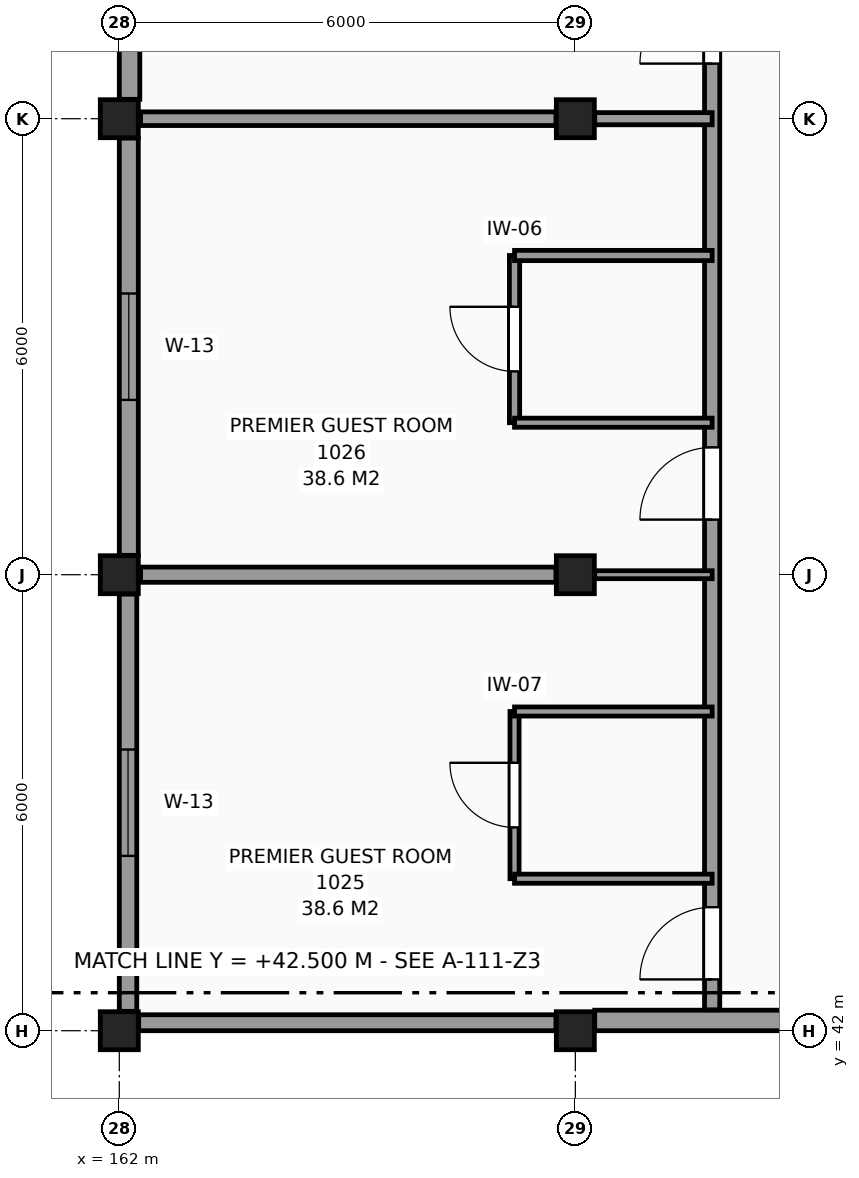
"""IFC4 building model, lengths in metres.
Left out: names, types, materials, properties, quantities, classifications, styles, units other than length and angle.
Written with IfcOpenShell. Run it as: python <this file> out.ifc"""

import sys

from ifc_helpers import new_model, si_unit, direction, frame, frame_2d, origin, origin_2d, place, context, subcontext, project, spatial, rectangle, extrude, element, fill, save


model = new_model("IFC4")
c1 = context("Model", 3, precision=1e-05, world=origin(), true_north=direction((0.0, 1.0)))
c2 = subcontext(c1, "Body", "Model", "MODEL_VIEW")
j1 = project(units=[si_unit("LENGTHUNIT", "METRE"), si_unit("PLANEANGLEUNIT", "RADIAN")], contexts=[c1])
p1 = place(None, origin())
s1 = spatial("IfcSite", under=j1, at=p1, CompositionType="ELEMENT")
p2 = place(p1, origin())
s2 = spatial("IfcBuilding", under=s1, at=p2, CompositionType="ELEMENT")
p3 = place(p2, frame((0.0, 0.0, 41.4)))
s3 = spatial("IfcBuildingStorey", under=s2, at=p3, CompositionType="ELEMENT", Elevation=41.4)
for number, where, z_axis, x_axis in (
    (1, (162.0, 42.0, 0.0), (0.0, 0.0, 1.0), (1.0, 0.0, 0.0)),
    (2, (162.0, 48.0, 0.0), (0.0, 0.0, 1.0), (1.0, 0.0, 0.0)),
    (3, (162.0, 54.0, 0.0), (0.0, 0.0, 1.0), (1.0, 0.0, 0.0)),
    (4, (168.0, 42.0, 0.0), (0.0, 0.0, 1.0), (1.0, 0.0, 0.0)),
    (5, (168.0, 48.0, 0.0), (0.0, 0.0, 1.0), (1.0, 0.0, 0.0)),
    (6, (168.0, 54.0, 0.0), (0.0, 0.0, 1.0), (1.0, 0.0, 0.0)),
):
    element("IfcColumn", number, at=place(p3, frame(where, z_axis=z_axis, x_axis=x_axis)), inside=s3, PredefinedType="COLUMN", context=c2, shape_type="SweptSolid", body=[
        extrude(rectangle(XDim=0.5, YDim=0.5, at=origin_2d()), origin(), (0.0, 0.0, 1.0), 3.3),
    ])
p4 = place(p3, frame((162.135, 59.745, 0.0), z_axis=(0.0, 0.0, 1.0), x_axis=(0.0, -1.0, 0.0)))
e7 = element("IfcWall", 7, at=p4, inside=s3, PredefinedType="SOLIDWALL", context=c2, shape_type="SweptSolid", body=[
    extrude(rectangle(XDim=5.49, YDim=0.27, at=frame_2d((2.745, 0.0))), origin(), (0.0, 0.0, 1.0), 2.445),
])
p5 = place(p4, frame((2.045, 0.0, 0.8)))
e8 = element("IfcOpeningElement", 8, at=p5, cuts=e7, PredefinedType="OPENING", context=c2, shape_type="SweptSolid", body=[
    extrude(rectangle(XDim=1.4, YDim=1.4, at=frame_2d((0.7, 0.7))), frame((0.0, 0.145, 0.0), z_axis=(0.0, -1.0, 0.0), x_axis=(1.0, 0.0, 0.0)), (0.0, 0.0, 1.0), 0.29),
])
p6 = place(p3, frame((162.125, 53.745, 0.0), z_axis=(0.0, 0.0, 1.0), x_axis=(0.0, -1.0, 0.0)))
e9 = element("IfcWall", 9, at=p6, inside=s3, PredefinedType="SOLIDWALL", context=c2, shape_type="SweptSolid", body=[
    extrude(rectangle(XDim=5.49, YDim=0.25, at=frame_2d((2.745, 0.0))), origin(), (0.0, 0.0, 1.0), 2.445),
])
p7 = place(p6, frame((2.045, 0.0, 0.8)))
e10 = element("IfcOpeningElement", 10, at=p7, cuts=e9, PredefinedType="OPENING", context=c2, shape_type="SweptSolid", body=[
    extrude(rectangle(XDim=1.4, YDim=1.4, at=frame_2d((0.7, 0.7))), frame((0.0, 0.135, 0.0), z_axis=(0.0, -1.0, 0.0), x_axis=(1.0, 0.0, 0.0)), (0.0, 0.0, 1.0), 0.27),
])
p8 = place(p3, frame((162.115, 47.745, 0.0), z_axis=(0.0, 0.0, 1.0), x_axis=(0.0, -1.0, 0.0)))
e11 = element("IfcWall", 11, at=p8, inside=s3, PredefinedType="SOLIDWALL", context=c2, shape_type="SweptSolid", body=[
    extrude(rectangle(XDim=5.49, YDim=0.23, at=frame_2d((2.745, 0.0))), origin(), (0.0, 0.0, 1.0), 2.445),
])
p9 = place(p8, frame((2.045, 0.0, 0.8)))
e12 = element("IfcOpeningElement", 12, at=p9, cuts=e11, PredefinedType="OPENING", context=c2, shape_type="SweptSolid", body=[
    extrude(rectangle(XDim=1.4, YDim=1.4, at=frame_2d((0.7, 0.7))), frame((0.0, 0.125, 0.0), z_axis=(0.0, -1.0, 0.0), x_axis=(1.0, 0.0, 0.0)), (0.0, 0.0, 1.0), 0.25),
])
p10 = place(p3, frame((162.255, 42.105, 0.0), z_axis=(0.0, 0.0, 1.0), x_axis=(1.0, 0.0, 0.0)))
e13 = element("IfcWall", 13, at=p10, inside=s3, PredefinedType="SOLIDWALL", context=c2, shape_type="SweptSolid", body=[
    extrude(rectangle(XDim=5.49, YDim=0.21, at=frame_2d((2.745, 0.0))), origin(), (0.0, 0.0, 1.0), 2.295),
])
p11 = place(p3, frame((168.255, 42.135, 0.0), z_axis=(0.0, 0.0, 1.0), x_axis=(1.0, 0.0, 0.0)))
e14 = element("IfcWall", 14, at=p11, inside=s3, PredefinedType="SOLIDWALL", context=c2, shape_type="SweptSolid", body=[
    extrude(rectangle(XDim=5.49, YDim=0.27, at=frame_2d((2.745, 0.0))), origin(), (0.0, 0.0, 1.0), 2.295),
])
p12 = place(p3, frame((167.2, 44.0, 0.0), z_axis=(0.0, 0.0, 1.0), x_axis=(0.0, 1.0, 0.0)))
e15 = element("IfcWall", 15, at=p12, inside=s3, PredefinedType="PARTITIONING", context=c2, shape_type="SweptSolid", body=[
    extrude(rectangle(XDim=2.2, YDim=0.12, at=frame_2d((1.1, 0.0))), origin(), (0.0, 0.0, 1.0), 3.06),
])
p13 = place(p12, frame((0.675, 0.0, 0.0)))
e16 = element("IfcOpeningElement", 16, at=p13, cuts=e15, PredefinedType="OPENING", context=c2, shape_type="SweptSolid", body=[
    extrude(rectangle(XDim=0.85, YDim=2.1, at=frame_2d((0.425, 1.05))), frame((0.0, 0.07, 0.0), z_axis=(0.0, -1.0, 0.0), x_axis=(1.0, 0.0, 0.0)), (0.0, 0.0, 1.0), 0.14),
])
p14 = place(p3, frame((167.2, 50.0, 0.0), z_axis=(0.0, 0.0, 1.0), x_axis=(0.0, 1.0, 0.0)))
e17 = element("IfcWall", 17, at=p14, inside=s3, PredefinedType="PARTITIONING", context=c2, shape_type="SweptSolid", body=[
    extrude(rectangle(XDim=2.2, YDim=0.135, at=frame_2d((1.1, 0.0))), origin(), (0.0, 0.0, 1.0), 3.06),
])
p15 = place(p14, frame((0.675, 0.0, 0.0)))
e18 = element("IfcOpeningElement", 18, at=p15, cuts=e17, PredefinedType="OPENING", context=c2, shape_type="SweptSolid", body=[
    extrude(rectangle(XDim=0.85, YDim=2.1, at=frame_2d((0.425, 1.05))), frame((0.0, 0.078, 0.0), z_axis=(0.0, -1.0, 0.0), x_axis=(1.0, 0.0, 0.0)), (0.0, 0.0, 1.0), 0.155),
])
p16 = place(p3, frame((169.8, 42.275, 0.0), z_axis=(0.0, 0.0, 1.0), x_axis=(0.0, 1.0, 0.0)))
e19 = element("IfcWall", 19, at=p16, inside=s3, PredefinedType="PARTITIONING", context=c2, shape_type="SweptSolid", body=[
    extrude(rectangle(XDim=65.545, YDim=0.2, at=frame_2d((32.772, 0.0))), origin(), (0.0, 0.0, 1.0), 3.06),
])
p17 = place(p16, frame((50.125, 0.0, 0.0)))
e20 = element("IfcOpeningElement", 20, at=p17, cuts=e19, PredefinedType="OPENING", context=c2, shape_type="SweptSolid", body=[
    extrude(rectangle(XDim=1.2, YDim=2.2, at=frame_2d((0.6, 1.1))), frame((0.0, 0.11, 0.0), z_axis=(0.0, -1.0, 0.0), x_axis=(1.0, 0.0, 0.0)), (0.0, 0.0, 1.0), 0.22),
])
p18 = place(p16, frame((31.925, 0.0, 0.0)))
e21 = element("IfcOpeningElement", 21, at=p18, cuts=e19, PredefinedType="OPENING", context=c2, shape_type="SweptSolid", body=[
    extrude(rectangle(XDim=1.6, YDim=2.25, at=frame_2d((0.8, 1.125))), frame((0.0, 0.11, 0.0), z_axis=(0.0, -1.0, 0.0), x_axis=(1.0, 0.0, 0.0)), (0.0, 0.0, 1.0), 0.22),
])
p19 = place(p16, frame((0.4, 0.0, 0.0)))
e22 = element("IfcOpeningElement", 22, at=p19, cuts=e19, PredefinedType="OPENING", context=c2, shape_type="SweptSolid", body=[
    extrude(rectangle(XDim=0.95, YDim=2.1, at=frame_2d((0.475, 1.05))), frame((0.0, 0.11, 0.0), z_axis=(0.0, -1.0, 0.0), x_axis=(1.0, 0.0, 0.0)), (0.0, 0.0, 1.0), 0.22),
])
p20 = place(p16, frame((6.45, 0.0, 0.0)))
e23 = element("IfcOpeningElement", 23, at=p20, cuts=e19, PredefinedType="OPENING", context=c2, shape_type="SweptSolid", body=[
    extrude(rectangle(XDim=0.95, YDim=2.1, at=frame_2d((0.475, 1.05))), frame((0.0, 0.11, 0.0), z_axis=(0.0, -1.0, 0.0), x_axis=(1.0, 0.0, 0.0)), (0.0, 0.0, 1.0), 0.22),
])
p21 = place(p16, frame((12.45, 0.0, 0.0)))
e24 = element("IfcOpeningElement", 24, at=p21, cuts=e19, PredefinedType="OPENING", context=c2, shape_type="SweptSolid", body=[
    extrude(rectangle(XDim=0.95, YDim=2.1, at=frame_2d((0.475, 1.05))), frame((0.0, 0.11, 0.0), z_axis=(0.0, -1.0, 0.0), x_axis=(1.0, 0.0, 0.0)), (0.0, 0.0, 1.0), 0.22),
])
p22 = place(p16, frame((18.45, 0.0, 0.0)))
e25 = element("IfcOpeningElement", 25, at=p22, cuts=e19, PredefinedType="OPENING", context=c2, shape_type="SweptSolid", body=[
    extrude(rectangle(XDim=0.95, YDim=2.1, at=frame_2d((0.475, 1.05))), frame((0.0, 0.11, 0.0), z_axis=(0.0, -1.0, 0.0), x_axis=(1.0, 0.0, 0.0)), (0.0, 0.0, 1.0), 0.22),
])
p23 = place(p16, frame((54.45, 0.0, 0.0)))
e26 = element("IfcOpeningElement", 26, at=p23, cuts=e19, PredefinedType="OPENING", context=c2, shape_type="SweptSolid", body=[
    extrude(rectangle(XDim=0.95, YDim=2.1, at=frame_2d((0.475, 1.05))), frame((0.0, 0.11, 0.0), z_axis=(0.0, -1.0, 0.0), x_axis=(1.0, 0.0, 0.0)), (0.0, 0.0, 1.0), 0.22),
])
p24 = place(p16, frame((60.45, 0.0, 0.0)))
e27 = element("IfcOpeningElement", 27, at=p24, cuts=e19, PredefinedType="OPENING", context=c2, shape_type="SweptSolid", body=[
    extrude(rectangle(XDim=0.95, YDim=2.1, at=frame_2d((0.475, 1.05))), frame((0.0, 0.11, 0.0), z_axis=(0.0, -1.0, 0.0), x_axis=(1.0, 0.0, 0.0)), (0.0, 0.0, 1.0), 0.22),
])
for number, where, z_axis, x_axis in (
    (28, (167.2, 44.0, 0.0), (0.0, 0.0, 1.0), (1.0, 0.0, 0.0)),
    (29, (167.2, 46.2, 0.0), (0.0, 0.0, 1.0), (1.0, 0.0, 0.0)),
):
    element("IfcWall", number, at=place(p3, frame(where, z_axis=z_axis, x_axis=x_axis)), inside=s3, PredefinedType="PARTITIONING", context=c2, shape_type="SweptSolid", body=[
        extrude(rectangle(XDim=2.6, YDim=0.12, at=frame_2d((1.3, 0.0))), origin(), (0.0, 0.0, 1.0), 3.06),
    ])
p25 = place(p3, frame((162.28, 48.0, 0.0), z_axis=(0.0, 0.0, 1.0), x_axis=(1.0, 0.0, 0.0)))
e30 = element("IfcWall", 30, at=p25, inside=s3, PredefinedType="PARTITIONING", context=c2, shape_type="SweptSolid", body=[
    extrude(rectangle(XDim=5.465, YDim=0.2, at=frame_2d((2.732, 0.0))), origin(), (0.0, 0.0, 1.0), 2.645),
])
p26 = place(p3, frame((168.255, 48.0, 0.0), z_axis=(0.0, 0.0, 1.0), x_axis=(1.0, 0.0, 0.0)))
e31 = element("IfcWall", 31, at=p26, inside=s3, PredefinedType="PARTITIONING", context=c2, shape_type="SweptSolid", body=[
    extrude(rectangle(XDim=1.545, YDim=0.105, at=frame_2d((0.772, 0.0))), origin(), (0.0, 0.0, 1.0), 2.805),
])
p27 = place(p3, frame((167.2, 50.0, 0.0), z_axis=(0.0, 0.0, 1.0), x_axis=(1.0, 0.0, 0.0)))
e32 = element("IfcWall", 32, at=p27, inside=s3, PredefinedType="PARTITIONING", context=c2, shape_type="SweptSolid", body=[
    extrude(rectangle(XDim=2.6, YDim=0.12, at=frame_2d((1.3, 0.0))), origin(), (0.0, 0.0, 1.0), 3.06),
])
p28 = place(p3, frame((167.2, 52.2, 0.0), z_axis=(0.0, 0.0, 1.0), x_axis=(1.0, 0.0, 0.0)))
e33 = element("IfcWall", 33, at=p28, inside=s3, PredefinedType="PARTITIONING", context=c2, shape_type="SweptSolid", body=[
    extrude(rectangle(XDim=2.6, YDim=0.135, at=frame_2d((1.3, 0.0))), origin(), (0.0, 0.0, 1.0), 3.06),
])
p29 = place(p3, frame((162.28, 54.0, 0.0), z_axis=(0.0, 0.0, 1.0), x_axis=(1.0, 0.0, 0.0)))
e34 = element("IfcWall", 34, at=p29, inside=s3, PredefinedType="PARTITIONING", context=c2, shape_type="SweptSolid", body=[
    extrude(rectangle(XDim=5.465, YDim=0.18, at=frame_2d((2.732, 0.0))), origin(), (0.0, 0.0, 1.0), 2.295),
])
p30 = place(p3, frame((168.255, 54.0, 0.0), z_axis=(0.0, 0.0, 1.0), x_axis=(1.0, 0.0, 0.0)))
e35 = element("IfcWall", 35, at=p30, inside=s3, PredefinedType="PARTITIONING", context=c2, shape_type="SweptSolid", body=[
    extrude(rectangle(XDim=1.545, YDim=0.16, at=frame_2d((0.772, 0.0))), origin(), (0.0, 0.0, 1.0), 2.295),
])
p31 = place(p9, origin())
e36 = element("IfcWindow", 36, at=p31, inside=s3, PartitioningType="SINGLE_PANEL", PredefinedType="WINDOW", context=c2, shape_type="SweptSolid", body=[
    extrude(rectangle(XDim=1.4, YDim=1.4, at=frame_2d((0.7, 0.7))), frame((0.0, 0.03, 0.0), z_axis=(0.0, -1.0, 0.0), x_axis=(1.0, 0.0, 0.0)), (0.0, 0.0, 1.0), 0.06),
])
fill(e12, e36)
p32 = place(p7, origin())
e37 = element("IfcWindow", 37, at=p32, inside=s3, PartitioningType="SINGLE_PANEL", PredefinedType="WINDOW", context=c2, shape_type="SweptSolid", body=[
    extrude(rectangle(XDim=1.4, YDim=1.4, at=frame_2d((0.7, 0.7))), frame((0.0, 0.03, 0.0), z_axis=(0.0, -1.0, 0.0), x_axis=(1.0, 0.0, 0.0)), (0.0, 0.0, 1.0), 0.06),
])
fill(e10, e37)
p33 = place(p13, origin())
e38 = element("IfcDoor", 38, at=p33, inside=s3, OperationType="SINGLE_SWING_RIGHT", PredefinedType="DOOR", context=c2, shape_type="SweptSolid", body=[
    extrude(rectangle(XDim=0.85, YDim=2.1, at=frame_2d((0.425, 1.05))), frame((0.0, 0.025, 0.0), z_axis=(0.0, -1.0, 0.0), x_axis=(1.0, 0.0, 0.0)), (0.0, 0.0, 1.0), 0.05),
])
fill(e16, e38)
p34 = place(p19, origin())
e39 = element("IfcDoor", 39, at=p34, inside=s3, OperationType="SINGLE_SWING_LEFT", PredefinedType="DOOR", context=c2, shape_type="SweptSolid", body=[
    extrude(rectangle(XDim=0.95, YDim=2.1, at=frame_2d((0.475, 1.05))), frame((0.0, 0.025, 0.0), z_axis=(0.0, -1.0, 0.0), x_axis=(1.0, 0.0, 0.0)), (0.0, 0.0, 1.0), 0.05),
])
fill(e22, e39)
p35 = place(p15, origin())
e40 = element("IfcDoor", 40, at=p35, inside=s3, OperationType="SINGLE_SWING_RIGHT", PredefinedType="DOOR", context=c2, shape_type="SweptSolid", body=[
    extrude(rectangle(XDim=0.85, YDim=2.1, at=frame_2d((0.425, 1.05))), frame((0.0, 0.025, 0.0), z_axis=(0.0, -1.0, 0.0), x_axis=(1.0, 0.0, 0.0)), (0.0, 0.0, 1.0), 0.05),
])
fill(e18, e40)
p36 = place(p20, origin())
e41 = element("IfcDoor", 41, at=p36, inside=s3, OperationType="SINGLE_SWING_LEFT", PredefinedType="DOOR", context=c2, shape_type="SweptSolid", body=[
    extrude(rectangle(XDim=0.95, YDim=2.1, at=frame_2d((0.475, 1.05))), frame((0.0, 0.025, 0.0), z_axis=(0.0, -1.0, 0.0), x_axis=(1.0, 0.0, 0.0)), (0.0, 0.0, 1.0), 0.05),
])
fill(e23, e41)
p37 = place(p21, origin())
e42 = element("IfcDoor", 42, at=p37, inside=s3, OperationType="SINGLE_SWING_LEFT", PredefinedType="DOOR", context=c2, shape_type="SweptSolid", body=[
    extrude(rectangle(XDim=0.95, YDim=2.1, at=frame_2d((0.475, 1.05))), frame((0.0, 0.025, 0.0), z_axis=(0.0, -1.0, 0.0), x_axis=(1.0, 0.0, 0.0)), (0.0, 0.0, 1.0), 0.05),
])
fill(e24, e42)
save(model, sys.argv[1])
